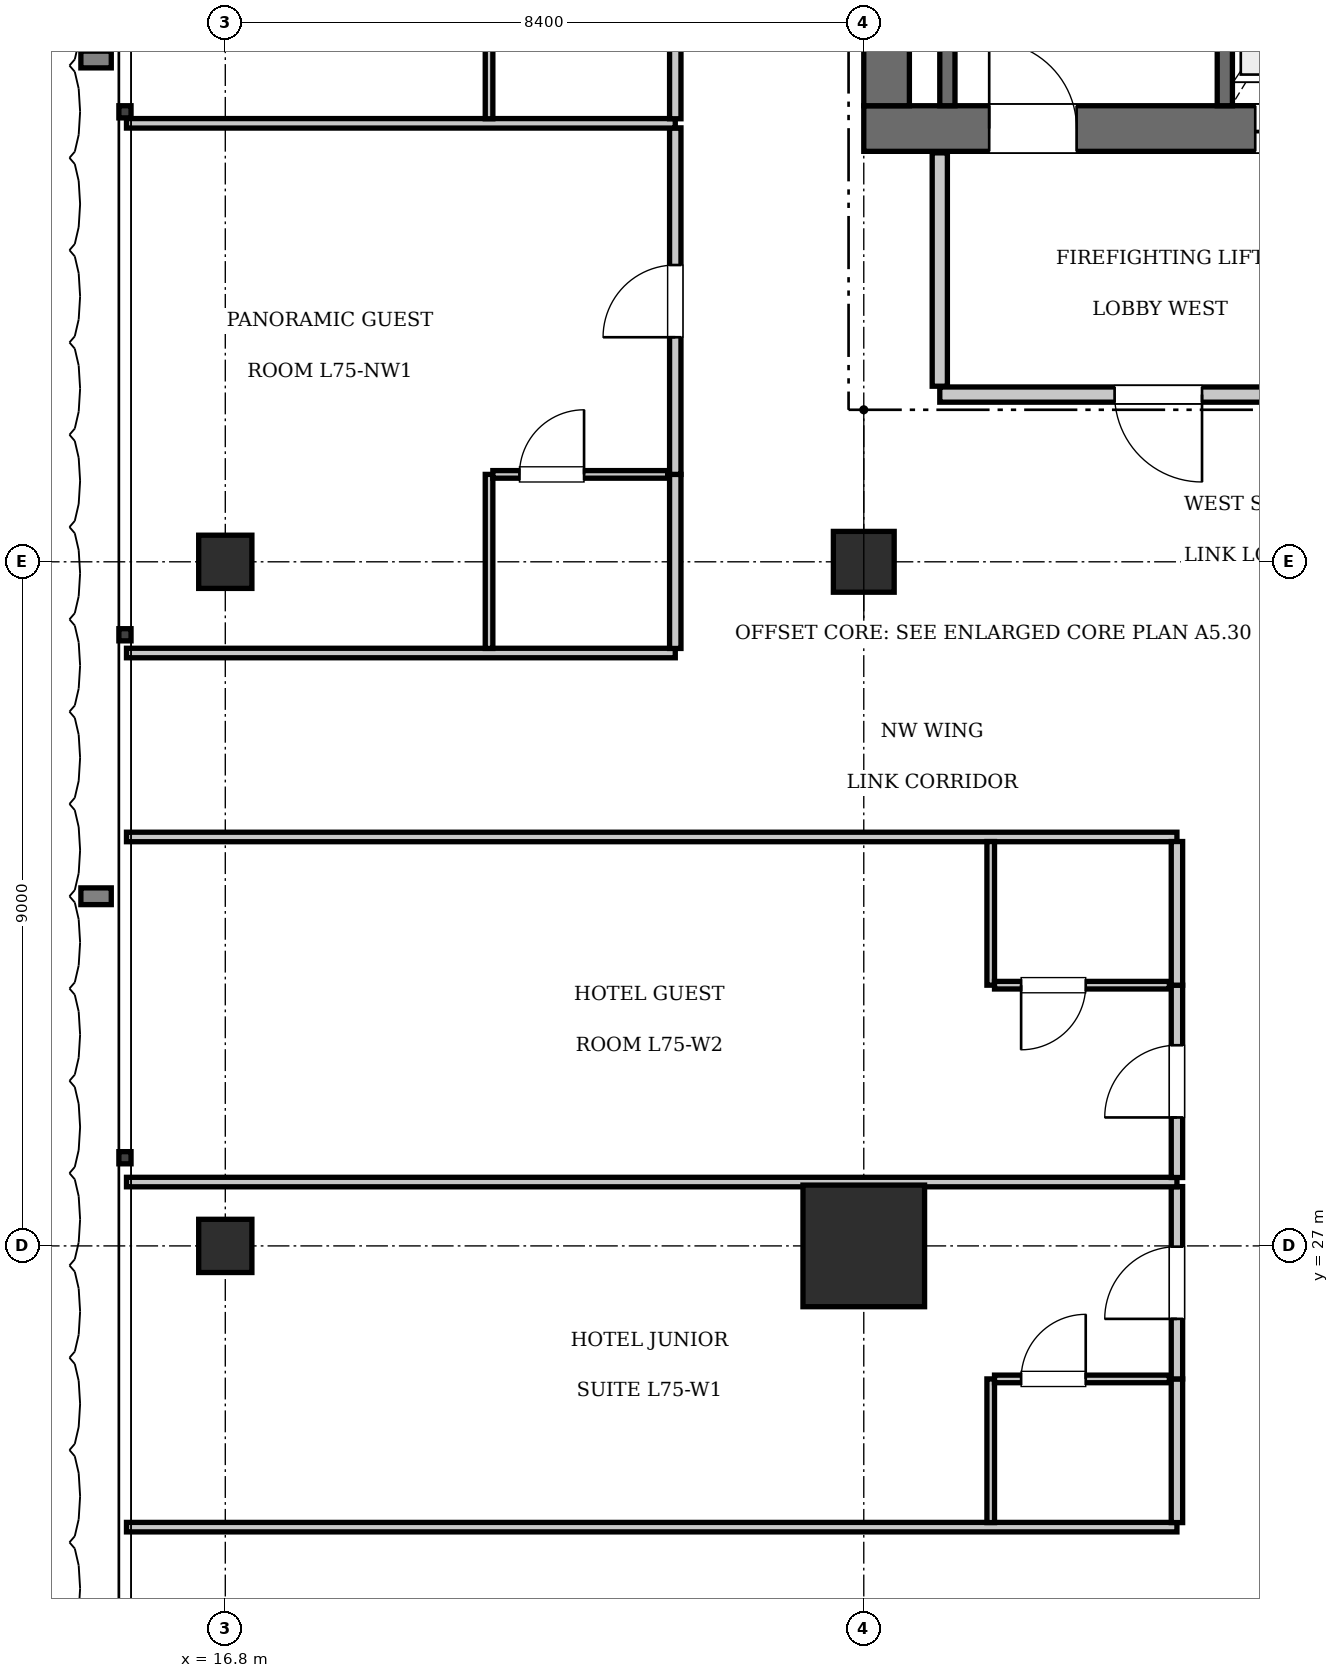
"""IFC4 building model, lengths in metres.
Left out: names, types, materials, properties, quantities, classifications, styles, units other than length and angle.
Written with IfcOpenShell. Run it as: python <this file> out.ifc"""

import sys

from ifc_helpers import new_model, si_unit, direction, frame, frame_2d, origin, origin_2d, place, context, subcontext, project, spatial, rectangle, extrude, element, fill, save


model = new_model("IFC4")
c1 = context("Model", 3, precision=1e-05, world=origin(), true_north=direction((0.0, 1.0)))
c2 = subcontext(c1, "Body", "Model", "MODEL_VIEW")
j1 = project(units=[si_unit("LENGTHUNIT", "METRE"), si_unit("PLANEANGLEUNIT", "RADIAN")], contexts=[c1])
p1 = place(None, origin())
s1 = spatial("IfcSite", under=j1, at=p1, CompositionType="ELEMENT")
p2 = place(p1, origin())
s2 = spatial("IfcBuilding", under=s1, at=p2, CompositionType="ELEMENT")
p3 = place(p2, frame((0.0, 0.0, 304.85)))
s3 = spatial("IfcBuildingStorey", under=s2, at=p3, CompositionType="ELEMENT", Elevation=304.85)
p4 = place(p3, frame((25.2, 27.0, 0.0), z_axis=(0.0, 0.0, 1.0), x_axis=(1.0, 0.0, 0.0)))
e1 = element("IfcColumn", 1, at=p4, inside=s3, PredefinedType="COLUMN", context=c2, shape_type="SweptSolid", body=[
    extrude(rectangle(XDim=1.6, YDim=1.6, at=origin_2d()), origin(), (0.0, 0.0, 1.0), 3.85),
])
p5 = place(p3, frame((25.2, 41.7, 0.0), z_axis=(0.0, 0.0, 1.0), x_axis=(1.0, 0.0, 0.0)))
e2 = element("IfcWall", 2, at=p5, inside=s3, PredefinedType="SHEAR", context=c2, shape_type="SweptSolid", body=[
    extrude(rectangle(XDim=6.8, YDim=0.6, at=frame_2d((3.4, 0.0))), origin(), (0.0, 0.0, 1.0), 3.85),
])
p6 = place(p5, frame((1.65, 0.0, 0.0)))
e3 = element("IfcOpeningElement", 3, at=p6, cuts=e2, PredefinedType="OPENING", context=c2, shape_type="SweptSolid", body=[
    extrude(rectangle(XDim=1.15, YDim=2.15, at=frame_2d((0.575, 1.075))), frame((0.0, 0.31, 0.0), z_axis=(0.0, -1.0, 0.0), x_axis=(1.0, 0.0, 0.0)), (0.0, 0.0, 1.0), 0.62),
])
p7 = place(p5, frame((5.15, 0.0, 0.0)))
e4 = element("IfcOpeningElement", 4, at=p7, cuts=e2, PredefinedType="OPENING", context=c2, shape_type="SweptSolid", body=[
    extrude(rectangle(XDim=1.1, YDim=2.2, at=frame_2d((0.55, 1.1))), frame((0.0, 0.31, 0.0), z_axis=(0.0, -1.0, 0.0), x_axis=(1.0, 0.0, 0.0)), (0.0, 0.0, 1.0), 0.62),
])
p8 = place(p3, frame((25.5, 42.0, 0.0), z_axis=(0.0, 0.0, 1.0), x_axis=(0.0, 1.0, 0.0)))
e5 = element("IfcWall", 5, at=p8, inside=s3, PredefinedType="SHEAR", context=c2, shape_type="SweptSolid", body=[
    extrude(rectangle(XDim=2.2, YDim=0.6, at=frame_2d((1.1, 0.0))), origin(), (0.0, 0.0, 1.0), 3.85),
])
p9 = place(p3, frame((25.2, 36.0, 0.0), z_axis=(0.0, 0.0, 1.0), x_axis=(1.0, 0.0, 0.0)))
e6 = element("IfcColumn", 6, at=p9, inside=s3, PredefinedType="COLUMN", context=c2, shape_type="SweptSolid", body=[
    extrude(rectangle(XDim=0.8, YDim=0.8, at=origin_2d()), origin(), (0.0, 0.0, 1.0), 3.85),
])
for number, where, z_axis, x_axis in (
    (7, (16.8, 27.0, 0.0), (0.0, 0.0, 1.0), (1.0, 0.0, 0.0)),
    (8, (16.8, 36.0, 0.0), (0.0, 0.0, 1.0), (1.0, 0.0, 0.0)),
):
    element("IfcColumn", number, at=place(p3, frame(where, z_axis=z_axis, x_axis=x_axis)), inside=s3, PredefinedType="COLUMN", context=c2, shape_type="SweptSolid", body=[
        extrude(rectangle(XDim=0.7, YDim=0.7, at=origin_2d()), origin(), (0.0, 0.0, 1.0), 3.85),
    ])
p10 = place(p3, frame((29.95, 42.0, 0.0), z_axis=(0.0, 0.0, 1.0), x_axis=(0.0, 1.0, 0.0)))
e9 = element("IfcWall", 9, at=p10, inside=s3, PredefinedType="SOLIDWALL", context=c2, shape_type="SweptSolid", body=[
    extrude(rectangle(XDim=9.15, YDim=0.2, at=frame_2d((4.575, 0.0))), origin(), (0.0, 0.0, 1.0), 3.61),
])
p11 = place(p3, frame((26.3, 42.0, 0.0), z_axis=(0.0, 0.0, 1.0), x_axis=(0.0, 1.0, 0.0)))
e10 = element("IfcWall", 10, at=p11, inside=s3, PredefinedType="SOLIDWALL", context=c2, shape_type="SweptSolid", body=[
    extrude(rectangle(XDim=9.12, YDim=0.2, at=frame_2d((4.56, 0.0))), origin(), (0.0, 0.0, 1.0), 3.61),
])
p12 = place(p3, frame((26.2, 38.2, 0.0), z_axis=(0.0, 0.0, 1.0), x_axis=(1.0, 0.0, 0.0)))
e11 = element("IfcWall", 11, at=p12, inside=s3, PredefinedType="PARTITIONING", context=c2, shape_type="SweptSolid", body=[
    extrude(rectangle(XDim=5.8, YDim=0.2, at=frame_2d((2.9, 0.0))), origin(), (0.0, 0.0, 1.0), 3.61),
])
p13 = place(p12, frame((2.3, 0.0, 0.0)))
e12 = element("IfcOpeningElement", 12, at=p13, cuts=e11, PredefinedType="OPENING", context=c2, shape_type="SweptSolid", body=[
    extrude(rectangle(XDim=1.15, YDim=2.15, at=frame_2d((0.575, 1.075))), frame((0.0, 0.11, 0.0), z_axis=(0.0, -1.0, 0.0), x_axis=(1.0, 0.0, 0.0)), (0.0, 0.0, 1.0), 0.22),
])
p14 = place(p3, frame((26.2, 38.31, 0.0), z_axis=(0.0, 0.0, 1.0), x_axis=(0.0, 1.0, 0.0)))
e13 = element("IfcWall", 13, at=p14, inside=s3, PredefinedType="PARTITIONING", context=c2, shape_type="SweptSolid", body=[
    extrude(rectangle(XDim=3.07, YDim=0.2, at=frame_2d((1.535, 0.0))), origin(), (0.0, 0.0, 1.0), 3.61),
])
for number, where, z_axis, x_axis in (
    (14, (15.5, 23.3, 0.0), (0.0, 0.0, 1.0), (1.0, 0.0, 0.0)),
    (15, (15.5, 32.38, 0.0), (0.0, 0.0, 1.0), (1.0, 0.0, 0.0)),
):
    element("IfcWall", number, at=place(p3, frame(where, z_axis=z_axis, x_axis=x_axis)), inside=s3, PredefinedType="PARTITIONING", context=c2, shape_type="SweptSolid", body=[
        extrude(rectangle(XDim=13.82, YDim=0.125, at=frame_2d((6.91, 0.0))), origin(), (0.0, 0.0, 1.0), 3.61),
    ])
p15 = place(p3, frame((29.32, 23.36, 0.0), z_axis=(0.0, 0.0, 1.0), x_axis=(0.0, 1.0, 0.0)))
e16 = element("IfcWall", 16, at=p15, inside=s3, PredefinedType="PARTITIONING", context=c2, shape_type="SweptSolid", body=[
    extrude(rectangle(XDim=1.89, YDim=0.15, at=frame_2d((0.945, 0.0))), origin(), (0.0, 0.0, 1.0), 3.61),
])
p16 = place(p3, frame((29.32, 25.25, 0.0), z_axis=(0.0, 0.0, 1.0), x_axis=(0.0, 1.0, 0.0)))
e17 = element("IfcWall", 17, at=p16, inside=s3, PredefinedType="PARTITIONING", context=c2, shape_type="SweptSolid", body=[
    extrude(rectangle(XDim=2.53, YDim=0.15, at=frame_2d((1.265, 0.0))), origin(), (0.0, 0.0, 1.0), 3.61),
])
p17 = place(p16, frame((0.79, 0.0, 0.0)))
e18 = element("IfcOpeningElement", 18, at=p17, cuts=e17, PredefinedType="OPENING", context=c2, shape_type="SweptSolid", body=[
    extrude(rectangle(XDim=0.95, YDim=2.15, at=frame_2d((0.475, 1.075))), frame((0.0, 0.085, 0.0), z_axis=(0.0, -1.0, 0.0), x_axis=(1.0, 0.0, 0.0)), (0.0, 0.0, 1.0), 0.17),
])
p18 = place(p3, frame((26.87, 23.36, 0.0), z_axis=(0.0, 0.0, 1.0), x_axis=(0.0, 1.0, 0.0)))
e19 = element("IfcWall", 19, at=p18, inside=s3, PredefinedType="PARTITIONING", context=c2, shape_type="SweptSolid", body=[
    extrude(rectangle(XDim=1.89, YDim=0.1, at=frame_2d((0.945, 0.0))), origin(), (0.0, 0.0, 1.0), 3.61),
])
p19 = place(p3, frame((26.92, 25.25, 0.0), z_axis=(0.0, 0.0, 1.0), x_axis=(1.0, 0.0, 0.0)))
e20 = element("IfcWall", 20, at=p19, inside=s3, PredefinedType="PARTITIONING", context=c2, shape_type="SweptSolid", body=[
    extrude(rectangle(XDim=2.3, YDim=0.1, at=frame_2d((1.15, 0.0))), origin(), (0.0, 0.0, 1.0), 3.61),
])
p20 = place(p19, frame((0.35, 0.0, 0.0)))
e21 = element("IfcOpeningElement", 21, at=p20, cuts=e20, PredefinedType="OPENING", context=c2, shape_type="SweptSolid", body=[
    extrude(rectangle(XDim=0.85, YDim=2.1, at=frame_2d((0.425, 1.05))), frame((0.0, 0.06, 0.0), z_axis=(0.0, -1.0, 0.0), x_axis=(1.0, 0.0, 0.0)), (0.0, 0.0, 1.0), 0.12),
])
p21 = place(p3, frame((15.5, 27.84, 0.0), z_axis=(0.0, 0.0, 1.0), x_axis=(1.0, 0.0, 0.0)))
e22 = element("IfcWall", 22, at=p21, inside=s3, PredefinedType="PARTITIONING", context=c2, shape_type="SweptSolid", body=[
    extrude(rectangle(XDim=13.82, YDim=0.125, at=frame_2d((6.91, 0.0))), origin(), (0.0, 0.0, 1.0), 3.61),
])
p22 = place(p3, frame((29.32, 27.9, 0.0), z_axis=(0.0, 0.0, 1.0), x_axis=(0.0, 1.0, 0.0)))
e23 = element("IfcWall", 23, at=p22, inside=s3, PredefinedType="PARTITIONING", context=c2, shape_type="SweptSolid", body=[
    extrude(rectangle(XDim=2.53, YDim=0.15, at=frame_2d((1.265, 0.0))), origin(), (0.0, 0.0, 1.0), 3.61),
])
p23 = place(p22, frame((0.79, 0.0, 0.0)))
e24 = element("IfcOpeningElement", 24, at=p23, cuts=e23, PredefinedType="OPENING", context=c2, shape_type="SweptSolid", body=[
    extrude(rectangle(XDim=0.95, YDim=2.15, at=frame_2d((0.475, 1.075))), frame((0.0, 0.085, 0.0), z_axis=(0.0, -1.0, 0.0), x_axis=(1.0, 0.0, 0.0)), (0.0, 0.0, 1.0), 0.17),
])
p24 = place(p3, frame((29.32, 30.43, 0.0), z_axis=(0.0, 0.0, 1.0), x_axis=(0.0, 1.0, 0.0)))
e25 = element("IfcWall", 25, at=p24, inside=s3, PredefinedType="PARTITIONING", context=c2, shape_type="SweptSolid", body=[
    extrude(rectangle(XDim=1.89, YDim=0.15, at=frame_2d((0.945, 0.0))), origin(), (0.0, 0.0, 1.0), 3.61),
])
p25 = place(p3, frame((26.87, 30.43, 0.0), z_axis=(0.0, 0.0, 1.0), x_axis=(0.0, 1.0, 0.0)))
e26 = element("IfcWall", 26, at=p25, inside=s3, PredefinedType="PARTITIONING", context=c2, shape_type="SweptSolid", body=[
    extrude(rectangle(XDim=1.89, YDim=0.1, at=frame_2d((0.945, 0.0))), origin(), (0.0, 0.0, 1.0), 3.61),
])
p26 = place(p3, frame((26.92, 30.43, 0.0), z_axis=(0.0, 0.0, 1.0), x_axis=(1.0, 0.0, 0.0)))
e27 = element("IfcWall", 27, at=p26, inside=s3, PredefinedType="PARTITIONING", context=c2, shape_type="SweptSolid", body=[
    extrude(rectangle(XDim=2.3, YDim=0.1, at=frame_2d((1.15, 0.0))), origin(), (0.0, 0.0, 1.0), 3.61),
])
p27 = place(p26, frame((0.35, 0.0, 0.0)))
e28 = element("IfcOpeningElement", 28, at=p27, cuts=e27, PredefinedType="OPENING", context=c2, shape_type="SweptSolid", body=[
    extrude(rectangle(XDim=0.85, YDim=2.1, at=frame_2d((0.425, 1.05))), frame((0.0, 0.06, 0.0), z_axis=(0.0, -1.0, 0.0), x_axis=(1.0, 0.0, 0.0)), (0.0, 0.0, 1.0), 0.12),
])
p28 = place(p3, frame((15.5, 34.8, 0.0), z_axis=(0.0, 0.0, 1.0), x_axis=(1.0, 0.0, 0.0)))
e29 = element("IfcWall", 29, at=p28, inside=s3, PredefinedType="PARTITIONING", context=c2, shape_type="SweptSolid", body=[
    extrude(rectangle(XDim=7.22, YDim=0.125, at=frame_2d((3.61, 0.0))), origin(), (0.0, 0.0, 1.0), 3.61),
])
p29 = place(p3, frame((22.72, 34.86, 0.0), z_axis=(0.0, 0.0, 1.0), x_axis=(0.0, 1.0, 0.0)))
e30 = element("IfcWall", 30, at=p29, inside=s3, PredefinedType="PARTITIONING", context=c2, shape_type="SweptSolid", body=[
    extrude(rectangle(XDim=2.29, YDim=0.15, at=frame_2d((1.145, 0.0))), origin(), (0.0, 0.0, 1.0), 3.61),
])
p30 = place(p3, frame((22.72, 37.15, 0.0), z_axis=(0.0, 0.0, 1.0), x_axis=(0.0, 1.0, 0.0)))
e31 = element("IfcWall", 31, at=p30, inside=s3, PredefinedType="PARTITIONING", context=c2, shape_type="SweptSolid", body=[
    extrude(rectangle(XDim=4.559, YDim=0.15, at=frame_2d((2.279, 0.0))), origin(), (0.0, 0.0, 1.0), 3.61),
])
p31 = place(p30, frame((1.804, 0.0, 0.0)))
e32 = element("IfcOpeningElement", 32, at=p31, cuts=e31, PredefinedType="OPENING", context=c2, shape_type="SweptSolid", body=[
    extrude(rectangle(XDim=0.95, YDim=2.15, at=frame_2d((0.475, 1.075))), frame((0.0, 0.085, 0.0), z_axis=(0.0, -1.0, 0.0), x_axis=(1.0, 0.0, 0.0)), (0.0, 0.0, 1.0), 0.17),
])
p32 = place(p3, frame((20.27, 34.86, 0.0), z_axis=(0.0, 0.0, 1.0), x_axis=(0.0, 1.0, 0.0)))
e33 = element("IfcWall", 33, at=p32, inside=s3, PredefinedType="PARTITIONING", context=c2, shape_type="SweptSolid", body=[
    extrude(rectangle(XDim=2.29, YDim=0.1, at=frame_2d((1.145, 0.0))), origin(), (0.0, 0.0, 1.0), 3.61),
])
p33 = place(p3, frame((20.32, 37.15, 0.0), z_axis=(0.0, 0.0, 1.0), x_axis=(1.0, 0.0, 0.0)))
e34 = element("IfcWall", 34, at=p33, inside=s3, PredefinedType="PARTITIONING", context=c2, shape_type="SweptSolid", body=[
    extrude(rectangle(XDim=2.3, YDim=0.1, at=frame_2d((1.15, 0.0))), origin(), (0.0, 0.0, 1.0), 3.61),
])
p34 = place(p33, frame((0.35, 0.0, 0.0)))
e35 = element("IfcOpeningElement", 35, at=p34, cuts=e34, PredefinedType="OPENING", context=c2, shape_type="SweptSolid", body=[
    extrude(rectangle(XDim=0.85, YDim=2.1, at=frame_2d((0.425, 1.05))), frame((0.0, 0.06, 0.0), z_axis=(0.0, -1.0, 0.0), x_axis=(1.0, 0.0, 0.0)), (0.0, 0.0, 1.0), 0.12),
])
p35 = place(p3, frame((15.5, 41.769, 0.0), z_axis=(0.0, 0.0, 1.0), x_axis=(1.0, 0.0, 0.0)))
e36 = element("IfcWall", 36, at=p35, inside=s3, PredefinedType="PARTITIONING", context=c2, shape_type="SweptSolid", body=[
    extrude(rectangle(XDim=7.22, YDim=0.125, at=frame_2d((3.61, 0.0))), origin(), (0.0, 0.0, 1.0), 3.61),
])
p36 = place(p3, frame((22.72, 41.829, 0.0), z_axis=(0.0, 0.0, 1.0), x_axis=(0.0, 1.0, 0.0)))
e37 = element("IfcWall", 37, at=p36, inside=s3, PredefinedType="PARTITIONING", context=c2, shape_type="SweptSolid", body=[
    extrude(rectangle(XDim=2.29, YDim=0.15, at=frame_2d((1.145, 0.0))), origin(), (0.0, 0.0, 1.0), 3.61),
])
p37 = place(p3, frame((20.27, 41.829, 0.0), z_axis=(0.0, 0.0, 1.0), x_axis=(0.0, 1.0, 0.0)))
e38 = element("IfcWall", 38, at=p37, inside=s3, PredefinedType="PARTITIONING", context=c2, shape_type="SweptSolid", body=[
    extrude(rectangle(XDim=2.29, YDim=0.1, at=frame_2d((1.145, 0.0))), origin(), (0.0, 0.0, 1.0), 3.61),
])
p38 = place(p6, origin())
e39 = element("IfcDoor", 39, at=p38, inside=s3, OperationType="SINGLE_SWING_LEFT", PredefinedType="DOOR", context=c2, shape_type="SweptSolid", body=[
    extrude(rectangle(XDim=1.15, YDim=2.15, at=frame_2d((0.575, 1.075))), frame((0.0, 0.025, 0.0), z_axis=(0.0, -1.0, 0.0), x_axis=(1.0, 0.0, 0.0)), (0.0, 0.0, 1.0), 0.05),
])
fill(e3, e39)
p39 = place(p7, frame((1.1, 0.0, 0.0), z_axis=(0.0, 0.0, 1.0), x_axis=(-1.0, 0.0, 0.0)))
e40 = element("IfcDoor", 40, at=p39, inside=s3, OperationType="SLIDING_TO_LEFT", PredefinedType="DOOR", context=c2, shape_type="SweptSolid", body=[
    extrude(rectangle(XDim=1.1, YDim=2.2, at=frame_2d((0.55, 1.1))), frame((0.0, 0.025, 0.0), z_axis=(0.0, -1.0, 0.0), x_axis=(1.0, 0.0, 0.0)), (0.0, 0.0, 1.0), 0.05),
])
fill(e4, e40)
p40 = place(p13, frame((1.15, 0.0, 0.0), z_axis=(0.0, 0.0, 1.0), x_axis=(-1.0, 0.0, 0.0)))
e41 = element("IfcDoor", 41, at=p40, inside=s3, OperationType="SINGLE_SWING_LEFT", PredefinedType="DOOR", context=c2, shape_type="SweptSolid", body=[
    extrude(rectangle(XDim=1.15, YDim=2.15, at=frame_2d((0.575, 1.075))), frame((0.0, 0.025, 0.0), z_axis=(0.0, -1.0, 0.0), x_axis=(1.0, 0.0, 0.0)), (0.0, 0.0, 1.0), 0.05),
])
fill(e12, e41)
p41 = place(p20, origin())
e42 = element("IfcDoor", 42, at=p41, inside=s3, OperationType="SINGLE_SWING_RIGHT", PredefinedType="DOOR", context=c2, shape_type="SweptSolid", body=[
    extrude(rectangle(XDim=0.85, YDim=2.1, at=frame_2d((0.425, 1.05))), frame((0.0, 0.025, 0.0), z_axis=(0.0, -1.0, 0.0), x_axis=(1.0, 0.0, 0.0)), (0.0, 0.0, 1.0), 0.05),
])
fill(e21, e42)
p42 = place(p17, origin())
e43 = element("IfcDoor", 43, at=p42, inside=s3, OperationType="SINGLE_SWING_LEFT", PredefinedType="DOOR", context=c2, shape_type="SweptSolid", body=[
    extrude(rectangle(XDim=0.95, YDim=2.15, at=frame_2d((0.475, 1.075))), frame((0.0, 0.025, 0.0), z_axis=(0.0, -1.0, 0.0), x_axis=(1.0, 0.0, 0.0)), (0.0, 0.0, 1.0), 0.05),
])
fill(e18, e43)
p43 = place(p27, frame((0.85, 0.0, 0.0), z_axis=(0.0, 0.0, 1.0), x_axis=(-1.0, 0.0, 0.0)))
e44 = element("IfcDoor", 44, at=p43, inside=s3, OperationType="SINGLE_SWING_RIGHT", PredefinedType="DOOR", context=c2, shape_type="SweptSolid", body=[
    extrude(rectangle(XDim=0.85, YDim=2.1, at=frame_2d((0.425, 1.05))), frame((0.0, 0.025, 0.0), z_axis=(0.0, -1.0, 0.0), x_axis=(1.0, 0.0, 0.0)), (0.0, 0.0, 1.0), 0.05),
])
fill(e28, e44)
p44 = place(p23, origin())
e45 = element("IfcDoor", 45, at=p44, inside=s3, OperationType="SINGLE_SWING_LEFT", PredefinedType="DOOR", context=c2, shape_type="SweptSolid", body=[
    extrude(rectangle(XDim=0.95, YDim=2.15, at=frame_2d((0.475, 1.075))), frame((0.0, 0.025, 0.0), z_axis=(0.0, -1.0, 0.0), x_axis=(1.0, 0.0, 0.0)), (0.0, 0.0, 1.0), 0.05),
])
fill(e24, e45)
p45 = place(p34, origin())
e46 = element("IfcDoor", 46, at=p45, inside=s3, OperationType="SINGLE_SWING_RIGHT", PredefinedType="DOOR", context=c2, shape_type="SweptSolid", body=[
    extrude(rectangle(XDim=0.85, YDim=2.1, at=frame_2d((0.425, 1.05))), frame((0.0, 0.025, 0.0), z_axis=(0.0, -1.0, 0.0), x_axis=(1.0, 0.0, 0.0)), (0.0, 0.0, 1.0), 0.05),
])
fill(e35, e46)
p46 = place(p31, origin())
e47 = element("IfcDoor", 47, at=p46, inside=s3, OperationType="SINGLE_SWING_LEFT", PredefinedType="DOOR", context=c2, shape_type="SweptSolid", body=[
    extrude(rectangle(XDim=0.95, YDim=2.15, at=frame_2d((0.475, 1.075))), frame((0.0, 0.025, 0.0), z_axis=(0.0, -1.0, 0.0), x_axis=(1.0, 0.0, 0.0)), (0.0, 0.0, 1.0), 0.05),
])
fill(e32, e47)
save(model, sys.argv[1])
